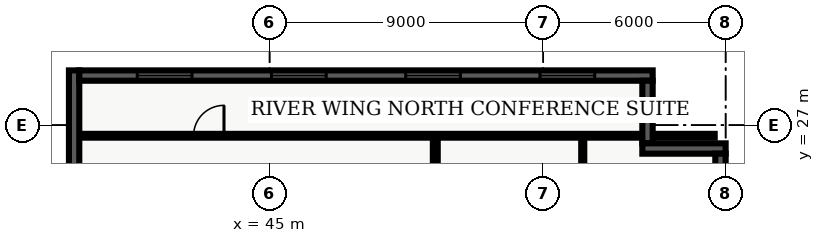
"""IFC4 building model, lengths in metres.
Left out: names, types, materials, properties, quantities, classifications, styles, units other than length and angle.
Written with IfcOpenShell. Run it as: python <this file> out.ifc"""

import sys

from ifc_helpers import new_model, entity, si_unit, converted_unit, direction, frame, origin_with_axes, origin_2d_with_axis, place, context, subcontext, project, spatial, polyline, rectangle, outline, extrude, element, fill, save


model = new_model("IFC4")
c1 = context("Model", 3, precision=1e-05, world=origin_with_axes(), true_north=direction((0.0, 1.0)))
c2 = subcontext(c1, "Body", "Model", "MODEL_VIEW")
j1 = project(units=[si_unit("LENGTHUNIT", "METRE"), converted_unit("PLANEANGLEUNIT", "DEGREE", entity("IfcPlaneAngleMeasure", 0.017), si_unit("PLANEANGLEUNIT", "RADIAN"), dimensions=[0, 0, 0, 0, 0, 0, 0])], contexts=[c1])
p1 = place(None, origin_with_axes())
s1 = spatial("IfcSite", under=j1, at=p1, CompositionType="ELEMENT")
p2 = place(p1, origin_with_axes())
s2 = spatial("IfcBuilding", under=s1, at=p2, CompositionType="ELEMENT")
p3 = place(p2, frame((0.0, 0.0, 160.2), z_axis=(0.0, 0.0, 1.0), x_axis=(1.0, 0.0, 0.0)))
s3 = spatial("IfcBuildingStorey", under=s2, at=p3, CompositionType="ELEMENT", Elevation=160.2)
p4 = place(p3, frame((50.45, 7.85, 0.0), z_axis=(0.0, 0.0, 1.0), x_axis=(0.0, 1.0, 0.0)))
e1 = element("IfcWall", 1, at=p4, inside=s3, PredefinedType="PARTITIONING", context=c2, shape_type="SweptSolid", body=[
    extrude(outline(polyline([(0.0, -0.08), (18.8, -0.08), (18.8, 0.08), (0.0, 0.08), (0.0, -0.08)])), origin_with_axes(), (0.0, 0.0, 1.0), 2.7),
])
p5 = place(p4, frame((4.12, 0.0, 0.0), z_axis=(0.0, 0.0, 1.0), x_axis=(1.0, 0.0, 0.0)))
e2 = element("IfcOpeningElement", 2, at=p5, cuts=e1, PredefinedType="OPENING", context=c2, shape_type="SweptSolid", body=[
    extrude(rectangle(XDim=1.0, YDim=0.18, at=origin_2d_with_axis()), origin_with_axes(), (0.0, 0.0, 1.0), 2.15),
])
p6 = place(p4, frame((13.46, 0.0, 0.0), z_axis=(0.0, 0.0, 1.0), x_axis=(1.0, 0.0, 0.0)))
e3 = element("IfcOpeningElement", 3, at=p6, cuts=e1, PredefinedType="OPENING", context=c2, shape_type="SweptSolid", body=[
    extrude(rectangle(XDim=1.0, YDim=0.18, at=origin_2d_with_axis()), origin_with_axes(), (0.0, 0.0, 1.0), 2.15),
])
p7 = place(p3, frame((38.735, 26.65, 0.0), z_axis=(0.0, 0.0, 1.0), x_axis=(1.0, 0.0, 0.0)))
e4 = element("IfcWall", 4, at=p7, inside=s3, PredefinedType="PARTITIONING", context=c2, shape_type="SweptSolid", body=[
    extrude(outline(polyline([(0.0, -0.062), (20.905, -0.062), (20.905, 0.062), (0.0, 0.062), (0.0, -0.062)])), origin_with_axes(), (0.0, 0.0, 1.0), 2.7),
])
p8 = place(p7, frame((4.265, 0.0, 0.0), z_axis=(0.0, 0.0, 1.0), x_axis=(1.0, 0.0, 0.0)))
e5 = element("IfcOpeningElement", 5, at=p8, cuts=e4, PredefinedType="OPENING", context=c2, shape_type="SweptSolid", body=[
    extrude(rectangle(XDim=1.0, YDim=0.145, at=origin_2d_with_axis()), origin_with_axes(), (0.0, 0.0, 1.0), 2.15),
])
p9 = place(p3, frame((55.3, 7.98, 0.0), z_axis=(0.0, 0.0, 1.0), x_axis=(0.0, 1.0, 0.0)))
e6 = element("IfcWall", 6, at=p9, inside=s3, PredefinedType="PARTITIONING", context=c2, shape_type="SweptSolid", body=[
    extrude(outline(polyline([(0.0, -0.05), (18.54, -0.05), (18.54, 0.05), (0.0, 0.05), (0.0, -0.05)])), origin_with_axes(), (0.0, 0.0, 1.0), 2.7),
])
p10 = place(p9, frame((3.99, 0.0, 0.0), z_axis=(0.0, 0.0, 1.0), x_axis=(1.0, 0.0, 0.0)))
e7 = element("IfcOpeningElement", 7, at=p10, cuts=e6, PredefinedType="OPENING", context=c2, shape_type="SweptSolid", body=[
    extrude(rectangle(XDim=0.95, YDim=0.12, at=origin_2d_with_axis()), origin_with_axes(), (0.0, 0.0, 1.0), 2.15),
])
p11 = place(p9, frame((13.331, 0.0, 0.0), z_axis=(0.0, 0.0, 1.0), x_axis=(1.0, 0.0, 0.0)))
e8 = element("IfcOpeningElement", 8, at=p11, cuts=e6, PredefinedType="OPENING", context=c2, shape_type="SweptSolid", body=[
    extrude(rectangle(XDim=0.95, YDim=0.12, at=origin_2d_with_axis()), origin_with_axes(), (0.0, 0.0, 1.0), 2.15),
])
p12 = place(p3, frame((38.57, 21.26, 0.0), z_axis=(0.0, 0.0, 1.0), x_axis=(0.0, 1.0, 0.0)))
e9 = element("IfcWall", 9, at=p12, inside=s3, PredefinedType="SOLIDWALL", context=c2, shape_type="SweptSolid", body=[
    extrude(outline(polyline([(0.0, -0.17), (7.54, -0.17), (7.54, 0.17), (0.0, 0.17), (0.0, -0.17)])), origin_with_axes(), (0.0, 0.0, 1.0), 3.66),
])
p13 = place(p3, frame((38.74, 28.63, 0.0), z_axis=(0.0, 0.0, 1.0), x_axis=(1.0, 0.0, 0.0)))
e10 = element("IfcWall", 10, at=p13, inside=s3, PredefinedType="SOLIDWALL", context=c2, shape_type="SweptSolid", body=[
    extrude(outline(polyline([(0.0, -0.17), (18.86, -0.17), (18.86, 0.17), (0.0, 0.17), (0.0, -0.17)])), origin_with_axes(), (0.0, 0.0, 1.0), 3.66),
])
p14 = place(p13, frame((2.808, 0.0, 0.45), z_axis=(0.0, 0.0, 1.0), x_axis=(1.0, 0.0, 0.0)))
e11 = element("IfcOpeningElement", 11, at=p14, cuts=e10, PredefinedType="OPENING", context=c2, shape_type="SweptSolid", body=[
    extrude(rectangle(XDim=1.8, YDim=0.36, at=origin_2d_with_axis()), origin_with_axes(), (0.0, 0.0, 1.0), 2.1),
])
p15 = place(p13, frame((7.222, 0.0, 0.45), z_axis=(0.0, 0.0, 1.0), x_axis=(1.0, 0.0, 0.0)))
e12 = element("IfcOpeningElement", 12, at=p15, cuts=e10, PredefinedType="OPENING", context=c2, shape_type="SweptSolid", body=[
    extrude(rectangle(XDim=1.8, YDim=0.36, at=origin_2d_with_axis()), origin_with_axes(), (0.0, 0.0, 1.0), 2.1),
])
p16 = place(p13, frame((11.637, 0.0, 0.45), z_axis=(0.0, 0.0, 1.0), x_axis=(1.0, 0.0, 0.0)))
e13 = element("IfcOpeningElement", 13, at=p16, cuts=e10, PredefinedType="OPENING", context=c2, shape_type="SweptSolid", body=[
    extrude(rectangle(XDim=1.8, YDim=0.36, at=origin_2d_with_axis()), origin_with_axes(), (0.0, 0.0, 1.0), 2.1),
])
p17 = place(p13, frame((16.053, 0.0, 0.45), z_axis=(0.0, 0.0, 1.0), x_axis=(1.0, 0.0, 0.0)))
e14 = element("IfcOpeningElement", 14, at=p17, cuts=e10, PredefinedType="OPENING", context=c2, shape_type="SweptSolid", body=[
    extrude(rectangle(XDim=1.8, YDim=0.36, at=origin_2d_with_axis()), origin_with_axes(), (0.0, 0.0, 1.0), 2.1),
])
p18 = place(p3, frame((57.43, 28.46, 0.0), z_axis=(0.0, 0.0, 1.0), x_axis=(0.0, -1.0, 0.0)))
e15 = element("IfcWall", 15, at=p18, inside=s3, PredefinedType="SOLIDWALL", context=c2, shape_type="SweptSolid", body=[
    extrude(outline(polyline([(0.0, -0.17), (2.06, -0.17), (2.06, 0.17), (0.0, 0.17), (0.0, -0.17)])), origin_with_axes(), (0.0, 0.0, 1.0), 3.66),
])
p19 = place(p3, frame((57.26, 26.23, 0.0), z_axis=(0.0, 0.0, 1.0), x_axis=(1.0, 0.0, 0.0)))
e16 = element("IfcWall", 16, at=p19, inside=s3, PredefinedType="SOLIDWALL", context=c2, shape_type="SweptSolid", body=[
    extrude(outline(polyline([(0.0, -0.17), (2.74, -0.17), (2.74, 0.17), (0.0, 0.17), (0.0, -0.17)])), origin_with_axes(), (0.0, 0.0, 1.0), 3.66),
])
p20 = place(p3, frame((59.83, 26.06, 0.0), z_axis=(0.0, 0.0, 1.0), x_axis=(0.0, -1.0, 0.0)))
e17 = element("IfcWall", 17, at=p20, inside=s3, PredefinedType="SOLIDWALL", context=c2, shape_type="SweptSolid", body=[
    extrude(outline(polyline([(0.0, -0.17), (23.66, -0.17), (23.66, 0.17), (0.0, 0.17), (0.0, -0.17)])), origin_with_axes(), (0.0, 0.0, 1.0), 3.66),
])
p21 = place(p20, frame((3.696, 0.0, 0.45), z_axis=(0.0, 0.0, 1.0), x_axis=(1.0, 0.0, 0.0)))
e18 = element("IfcOpeningElement", 18, at=p21, cuts=e17, PredefinedType="OPENING", context=c2, shape_type="SweptSolid", body=[
    extrude(rectangle(XDim=1.8, YDim=0.36, at=origin_2d_with_axis()), origin_with_axes(), (0.0, 0.0, 1.0), 2.1),
])
p22 = place(p20, frame((11.83, 0.0, 0.45), z_axis=(0.0, 0.0, 1.0), x_axis=(1.0, 0.0, 0.0)))
e19 = element("IfcOpeningElement", 19, at=p22, cuts=e17, PredefinedType="OPENING", context=c2, shape_type="SweptSolid", body=[
    extrude(rectangle(XDim=1.8, YDim=0.36, at=origin_2d_with_axis()), origin_with_axes(), (0.0, 0.0, 1.0), 2.1),
])
p23 = place(p20, frame((20.364, 0.0, 0.45), z_axis=(0.0, 0.0, 1.0), x_axis=(1.0, 0.0, 0.0)))
e20 = element("IfcOpeningElement", 20, at=p23, cuts=e17, PredefinedType="OPENING", context=c2, shape_type="SweptSolid", body=[
    extrude(rectangle(XDim=1.8, YDim=0.36, at=origin_2d_with_axis()), origin_with_axes(), (0.0, 0.0, 1.0), 2.1),
])
p24 = place(p7, frame((4.265, 0.0, 0.0), z_axis=(0.0, 0.0, 1.0), x_axis=(1.0, 0.0, 0.0)))
e21 = element("IfcDoor", 21, at=p24, inside=s3, OperationType="SINGLE_SWING_RIGHT", PredefinedType="DOOR", context=c2, shape_type="SweptSolid", body=[
    extrude(rectangle(XDim=1.0, YDim=0.075, at=origin_2d_with_axis()), origin_with_axes(), (0.0, 0.0, 1.0), 2.15),
])
fill(e5, e21)
p25 = place(p13, frame((2.808, 0.0, 0.45), z_axis=(0.0, 0.0, 1.0), x_axis=(1.0, 0.0, 0.0)))
e22 = element("IfcWindow", 22, at=p25, inside=s3, PredefinedType="WINDOW", context=c2, shape_type="SweptSolid", body=[
    extrude(rectangle(XDim=1.8, YDim=0.09, at=origin_2d_with_axis()), origin_with_axes(), (0.0, 0.0, 1.0), 2.1),
])
fill(e11, e22)
p26 = place(p13, frame((7.222, 0.0, 0.45), z_axis=(0.0, 0.0, 1.0), x_axis=(1.0, 0.0, 0.0)))
e23 = element("IfcWindow", 23, at=p26, inside=s3, PredefinedType="WINDOW", context=c2, shape_type="SweptSolid", body=[
    extrude(rectangle(XDim=1.8, YDim=0.09, at=origin_2d_with_axis()), origin_with_axes(), (0.0, 0.0, 1.0), 2.1),
])
fill(e12, e23)
p27 = place(p13, frame((11.637, 0.0, 0.45), z_axis=(0.0, 0.0, 1.0), x_axis=(1.0, 0.0, 0.0)))
e24 = element("IfcWindow", 24, at=p27, inside=s3, PredefinedType="WINDOW", context=c2, shape_type="SweptSolid", body=[
    extrude(rectangle(XDim=1.8, YDim=0.09, at=origin_2d_with_axis()), origin_with_axes(), (0.0, 0.0, 1.0), 2.1),
])
fill(e13, e24)
p28 = place(p13, frame((16.053, 0.0, 0.45), z_axis=(0.0, 0.0, 1.0), x_axis=(1.0, 0.0, 0.0)))
e25 = element("IfcWindow", 25, at=p28, inside=s3, PredefinedType="WINDOW", context=c2, shape_type="SweptSolid", body=[
    extrude(rectangle(XDim=1.8, YDim=0.09, at=origin_2d_with_axis()), origin_with_axes(), (0.0, 0.0, 1.0), 2.1),
])
fill(e14, e25)
save(model, sys.argv[1])
